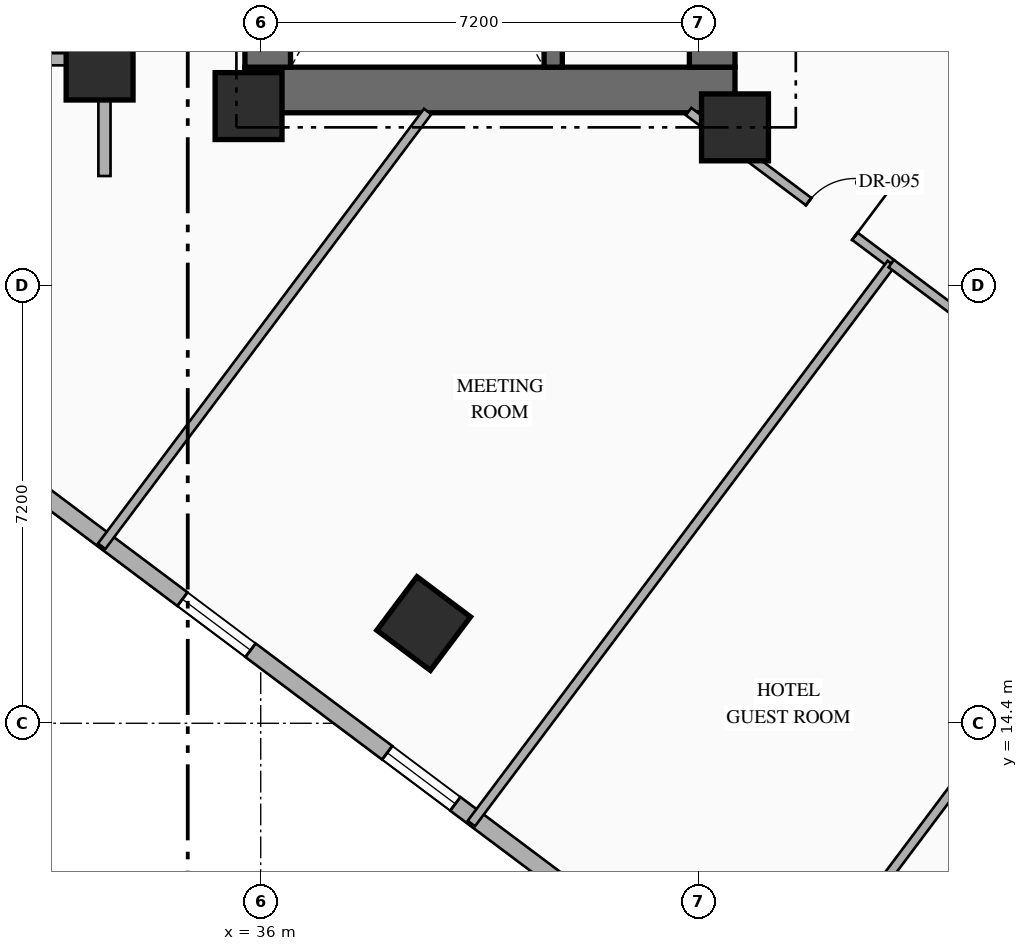
"""IFC4 building model, lengths in metres.
Left out: names, types, materials, properties, quantities, classifications, styles, units other than length and angle.
Written with IfcOpenShell. Run it as: python <this file> out.ifc"""

import sys

from ifc_helpers import new_model, si_unit, direction, frame, frame_2d, origin, origin_2d, place, context, subcontext, project, spatial, rectangle, hollow_rectangle, extrude, element, fill, save


model = new_model("IFC4")
c1 = context("Model", 3, precision=1e-05, world=origin(), true_north=direction((0.0, 1.0)))
c2 = subcontext(c1, "Body", "Model", "MODEL_VIEW")
j1 = project(units=[si_unit("LENGTHUNIT", "METRE"), si_unit("PLANEANGLEUNIT", "RADIAN")], contexts=[c1])
p1 = place(None, origin())
s1 = spatial("IfcSite", under=j1, at=p1, CompositionType="ELEMENT")
p2 = place(p1, origin())
s2 = spatial("IfcBuilding", under=s1, at=p2, CompositionType="ELEMENT")
p3 = place(p2, frame((0.0, 0.0, 39.95)))
s3 = spatial("IfcBuildingStorey", under=s2, at=p3, CompositionType="ELEMENT", Elevation=39.95)
p4 = place(p3, frame((35.74, 24.815, 0.0), z_axis=(0.0, 0.0, 1.0), x_axis=(1.0, 0.0, 0.0)))
e1 = element("IfcWall", 1, at=p4, inside=s3, PredefinedType="SHEAR", context=c2, shape_type="SweptSolid", body=[
    extrude(rectangle(XDim=8.06, YDim=0.75, at=frame_2d((4.03, 0.0))), origin(), (0.0, 0.0, 1.0), 3.35),
])
p5 = place(p3, frame((36.115, 25.19, 0.0), z_axis=(0.0, 0.0, 1.0), x_axis=(0.0, 1.0, 0.0)))
e2 = element("IfcWall", 2, at=p5, inside=s3, PredefinedType="SHEAR", context=c2, shape_type="SweptSolid", body=[
    extrude(rectangle(XDim=9.48, YDim=0.75, at=frame_2d((4.74, 0.0))), origin(), (0.0, 0.0, 1.0), 3.35),
])
p6 = place(p3, frame((43.425, 25.19, 0.0), z_axis=(0.0, 0.0, 1.0), x_axis=(0.0, 1.0, 0.0)))
e3 = element("IfcWall", 3, at=p6, inside=s3, PredefinedType="SHEAR", context=c2, shape_type="SweptSolid", body=[
    extrude(rectangle(XDim=9.48, YDim=0.75, at=frame_2d((4.74, 0.0))), origin(), (0.0, 0.0, 1.0), 3.35),
])
p7 = place(p6, frame((0.66, 0.0, 0.0)))
e4 = element("IfcOpeningElement", 4, at=p7, cuts=e3, PredefinedType="OPENING", context=c2, shape_type="SweptSolid", body=[
    extrude(rectangle(XDim=0.85, YDim=2.08, at=frame_2d((0.425, 1.04))), frame((0.0, 0.385, 0.0), z_axis=(0.0, -1.0, 0.0), x_axis=(1.0, 0.0, 0.0)), (0.0, 0.0, 1.0), 0.77),
])
p8 = place(p6, frame((2.86, 0.0, 0.0)))
e5 = element("IfcOpeningElement", 5, at=p8, cuts=e3, PredefinedType="OPENING", context=c2, shape_type="SweptSolid", body=[
    extrude(rectangle(XDim=0.85, YDim=2.08, at=frame_2d((0.425, 1.04))), frame((0.0, 0.385, 0.0), z_axis=(0.0, -1.0, 0.0), x_axis=(1.0, 0.0, 0.0)), (0.0, 0.0, 1.0), 0.77),
])
p9 = place(p6, frame((5.01, 0.0, 0.0)))
e6 = element("IfcOpeningElement", 6, at=p9, cuts=e3, PredefinedType="OPENING", context=c2, shape_type="SweptSolid", body=[
    extrude(rectangle(XDim=0.85, YDim=2.08, at=frame_2d((0.425, 1.04))), frame((0.0, 0.385, 0.0), z_axis=(0.0, -1.0, 0.0), x_axis=(1.0, 0.0, 0.0)), (0.0, 0.0, 1.0), 0.77),
])
p10 = place(p3, frame((40.81, 25.19, 0.0), z_axis=(0.0, 0.0, 1.0), x_axis=(0.0, 1.0, 0.0)))
e7 = element("IfcWall", 7, at=p10, inside=s3, PredefinedType="SHEAR", context=c2, shape_type="SweptSolid", body=[
    extrude(rectangle(XDim=9.48, YDim=0.3, at=frame_2d((4.74, 0.0))), origin(), (0.0, 0.0, 1.0), 3.35),
])
for number, where, z_axis, x_axis in (
    (8, (35.8, 24.55, 0.0), (0.0, 0.0, 1.0), (1.0, 0.0, 0.0)),
    (9, (43.8, 24.2, 0.0), (0.0, 0.0, 1.0), (1.0, 0.0, 0.0)),
):
    element("IfcColumn", number, at=place(p3, frame(where, z_axis=z_axis, x_axis=x_axis)), inside=s3, PredefinedType="COLUMN", context=c2, shape_type="SweptSolid", body=[
        extrude(rectangle(XDim=1.1, YDim=1.1, at=origin_2d()), origin(), (0.0, 0.0, 1.0), 3.35),
    ])
for number, where, z_axis, x_axis in (
    (10, (33.35, 25.2, 0.0), (0.0, 0.0, 1.0), (1.0, 0.0, 0.0)),
    (11, (38.68, 16.04, 0.0), (0.0, 0.0, 1.0), (0.8, -0.6, 0.0)),
):
    element("IfcColumn", number, at=place(p3, frame(where, z_axis=z_axis, x_axis=x_axis)), inside=s3, PredefinedType="COLUMN", context=c2, shape_type="SweptSolid", body=[
        extrude(hollow_rectangle(XDim=1.1, YDim=1.1, WallThickness=0.04, at=origin_2d()), origin(), (0.0, 0.0, 1.0), 3.35),
    ])
p11 = place(p3, frame((44.86, 40.73, 0.0), z_axis=(0.0, 0.0, 1.0), x_axis=(0.800006902154, -0.599990797017, 0.0)))
e12 = element("IfcWall", 12, at=p11, inside=s3, PredefinedType="STANDARD", context=c2, shape_type="SweptSolid", body=[
    extrude(rectangle(XDim=29.712, YDim=0.28, at=frame_2d((14.856, 0.0))), origin(), (0.0, 0.0, 1.0), 3.13),
])
p12 = place(p11, frame((14.249, 0.0, 0.0)))
e13 = element("IfcOpeningElement", 13, at=p12, cuts=e12, PredefinedType="OPENING", context=c2, shape_type="SweptSolid", body=[
    extrude(rectangle(XDim=1.1, YDim=2.2, at=frame_2d((0.55, 1.1))), frame((0.0, 0.15, 0.0), z_axis=(0.0, -1.0, 0.0), x_axis=(1.0, 0.0, 0.0)), (0.0, 0.0, 1.0), 0.3),
])
p13 = place(p11, frame((1.612, 0.0, 0.85)))
e14 = element("IfcOpeningElement", 14, at=p13, cuts=e12, PredefinedType="OPENING", context=c2, shape_type="SweptSolid", body=[
    extrude(rectangle(XDim=1.4, YDim=1.8, at=frame_2d((0.7, 0.9))), frame((0.0, 0.15, 0.0), z_axis=(0.0, -1.0, 0.0), x_axis=(1.0, 0.0, 0.0)), (0.0, 0.0, 1.0), 0.3),
])
p14 = place(p11, frame((5.667, 0.0, 0.85)))
e15 = element("IfcOpeningElement", 15, at=p14, cuts=e12, PredefinedType="OPENING", context=c2, shape_type="SweptSolid", body=[
    extrude(rectangle(XDim=1.4, YDim=1.8, at=frame_2d((0.7, 0.9))), frame((0.0, 0.15, 0.0), z_axis=(0.0, -1.0, 0.0), x_axis=(1.0, 0.0, 0.0)), (0.0, 0.0, 1.0), 0.3),
])
p15 = place(p11, frame((9.912, 0.0, 0.85)))
e16 = element("IfcOpeningElement", 16, at=p15, cuts=e12, PredefinedType="OPENING", context=c2, shape_type="SweptSolid", body=[
    extrude(rectangle(XDim=1.4, YDim=1.8, at=frame_2d((0.7, 0.9))), frame((0.0, 0.15, 0.0), z_axis=(0.0, -1.0, 0.0), x_axis=(1.0, 0.0, 0.0)), (0.0, 0.0, 1.0), 0.3),
])
p16 = place(p11, frame((19.743, 0.0, 0.85)))
e17 = element("IfcOpeningElement", 17, at=p16, cuts=e12, PredefinedType="OPENING", context=c2, shape_type="SweptSolid", body=[
    extrude(rectangle(XDim=1.4, YDim=1.8, at=frame_2d((0.7, 0.9))), frame((0.0, 0.15, 0.0), z_axis=(0.0, -1.0, 0.0), x_axis=(1.0, 0.0, 0.0)), (0.0, 0.0, 1.0), 0.3),
])
p17 = place(p11, frame((22.645, 0.0, 0.85)))
e18 = element("IfcOpeningElement", 18, at=p17, cuts=e12, PredefinedType="OPENING", context=c2, shape_type="SweptSolid", body=[
    extrude(rectangle(XDim=1.4, YDim=1.8, at=frame_2d((0.7, 0.9))), frame((0.0, 0.15, 0.0), z_axis=(0.0, -1.0, 0.0), x_axis=(1.0, 0.0, 0.0)), (0.0, 0.0, 1.0), 0.3),
])
p18 = place(p11, frame((26.7, 0.0, 0.85)))
e19 = element("IfcOpeningElement", 19, at=p18, cuts=e12, PredefinedType="OPENING", context=c2, shape_type="SweptSolid", body=[
    extrude(rectangle(XDim=1.4, YDim=1.8, at=frame_2d((0.7, 0.9))), frame((0.0, 0.15, 0.0), z_axis=(0.0, -1.0, 0.0), x_axis=(1.0, 0.0, 0.0)), (0.0, 0.0, 1.0), 0.3),
])
p19 = place(p3, frame((53.318, 2.487, 0.0), z_axis=(0.0, 0.0, 1.0), x_axis=(-0.800004174678, 0.599994433723, 0.0)))
e20 = element("IfcWall", 20, at=p19, inside=s3, PredefinedType="STANDARD", context=c2, shape_type="SweptSolid", body=[
    extrude(rectangle(XDim=35.089, YDim=0.28, at=frame_2d((17.544, 0.0))), origin(), (0.0, 0.0, 1.0), 3.13),
])
p20 = place(p19, frame((1.931, 0.0, 0.85)))
e21 = element("IfcOpeningElement", 21, at=p20, cuts=e20, PredefinedType="OPENING", context=c2, shape_type="SweptSolid", body=[
    extrude(rectangle(XDim=1.4, YDim=1.8, at=frame_2d((0.7, 0.9))), frame((0.0, 0.15, 0.0), z_axis=(0.0, -1.0, 0.0), x_axis=(1.0, 0.0, 0.0)), (0.0, 0.0, 1.0), 0.3),
])
p21 = place(p19, frame((6.819, 0.0, 0.85)))
e22 = element("IfcOpeningElement", 22, at=p21, cuts=e20, PredefinedType="OPENING", context=c2, shape_type="SweptSolid", body=[
    extrude(rectangle(XDim=1.4, YDim=1.8, at=frame_2d((0.7, 0.9))), frame((0.0, 0.15, 0.0), z_axis=(0.0, -1.0, 0.0), x_axis=(1.0, 0.0, 0.0)), (0.0, 0.0, 1.0), 0.3),
])
p22 = place(p19, frame((11.832, 0.0, 0.85)))
e23 = element("IfcOpeningElement", 23, at=p22, cuts=e20, PredefinedType="OPENING", context=c2, shape_type="SweptSolid", body=[
    extrude(rectangle(XDim=1.4, YDim=1.8, at=frame_2d((0.7, 0.9))), frame((0.0, 0.15, 0.0), z_axis=(0.0, -1.0, 0.0), x_axis=(1.0, 0.0, 0.0)), (0.0, 0.0, 1.0), 0.3),
])
p23 = place(p19, frame((17.647, 0.0, 0.85)))
e24 = element("IfcOpeningElement", 24, at=p23, cuts=e20, PredefinedType="OPENING", context=c2, shape_type="SweptSolid", body=[
    extrude(rectangle(XDim=1.4, YDim=1.8, at=frame_2d((0.7, 0.9))), frame((0.0, 0.15, 0.0), z_axis=(0.0, -1.0, 0.0), x_axis=(1.0, 0.0, 0.0)), (0.0, 0.0, 1.0), 0.3),
])
p24 = place(p19, frame((21.857, 0.0, 0.85)))
e25 = element("IfcOpeningElement", 25, at=p24, cuts=e20, PredefinedType="OPENING", context=c2, shape_type="SweptSolid", body=[
    extrude(rectangle(XDim=1.4, YDim=1.8, at=frame_2d((0.7, 0.9))), frame((0.0, 0.15, 0.0), z_axis=(0.0, -1.0, 0.0), x_axis=(1.0, 0.0, 0.0)), (0.0, 0.0, 1.0), 0.3),
])
p25 = place(p19, frame((26.87, 0.0, 0.85)))
e26 = element("IfcOpeningElement", 26, at=p25, cuts=e20, PredefinedType="OPENING", context=c2, shape_type="SweptSolid", body=[
    extrude(rectangle(XDim=1.4, YDim=1.8, at=frame_2d((0.7, 0.9))), frame((0.0, 0.15, 0.0), z_axis=(0.0, -1.0, 0.0), x_axis=(1.0, 0.0, 0.0)), (0.0, 0.0, 1.0), 0.3),
])
p26 = place(p19, frame((31.757, 0.0, 0.85)))
e27 = element("IfcOpeningElement", 27, at=p26, cuts=e20, PredefinedType="OPENING", context=c2, shape_type="SweptSolid", body=[
    extrude(rectangle(XDim=1.4, YDim=1.8, at=frame_2d((0.7, 0.9))), frame((0.0, 0.15, 0.0), z_axis=(0.0, -1.0, 0.0), x_axis=(1.0, 0.0, 0.0)), (0.0, 0.0, 1.0), 0.3),
])
p27 = place(p3, frame((33.43, 23.4, 0.0), z_axis=(0.0, 0.0, 1.0), x_axis=(0.0, 1.0, 0.0)))
e28 = element("IfcWall", 28, at=p27, inside=s3, PredefinedType="STANDARD", context=c2, shape_type="SweptSolid", body=[
    extrude(rectangle(XDim=4.08, YDim=0.2, at=frame_2d((2.04, 0.0))), origin(), (0.0, 0.0, 1.0), 2.425),
])
p28 = place(p3, frame((25.55, 25.32, 0.0), z_axis=(0.0, 0.0, 1.0), x_axis=(1.0, 0.0, 0.0)))
e29 = element("IfcWall", 29, at=p28, inside=s3, PredefinedType="STANDARD", context=c2, shape_type="SweptSolid", body=[
    extrude(rectangle(XDim=7.88, YDim=0.2, at=frame_2d((3.94, 0.0))), origin(), (0.0, 0.0, 1.0), 2.525),
])
p29 = place(p3, frame((43.037, 24.46, 0.0), z_axis=(0.0, 0.0, 1.0), x_axis=(0.799971872363, -0.600037501685, 0.0)))
e30 = element("IfcWall", 30, at=p29, inside=s3, PredefinedType="PARTITIONING", context=c2, shape_type="SweptSolid", body=[
    extrude(rectangle(XDim=4.167, YDim=0.15, at=frame_2d((2.083, 0.0))), origin(), (0.0, 0.0, 1.0), 2.425),
])
p30 = place(p29, frame((2.468, 0.0, 0.0)))
e31 = element("IfcOpeningElement", 31, at=p30, cuts=e30, PredefinedType="OPENING", context=c2, shape_type="SweptSolid", body=[
    extrude(rectangle(XDim=0.95, YDim=2.15, at=frame_2d((0.475, 1.075))), frame((0.0, 0.085, 0.0), z_axis=(0.0, -1.0, 0.0), x_axis=(1.0, 0.0, 0.0)), (0.0, 0.0, 1.0), 0.17),
])
p31 = place(p3, frame((33.384, 17.312, 0.0), z_axis=(0.0, 0.0, 1.0), x_axis=(0.600008743659, 0.799993442181, 0.0)))
e32 = element("IfcWall", 32, at=p31, inside=s3, PredefinedType="PARTITIONING", context=c2, shape_type="SweptSolid", body=[
    extrude(rectangle(XDim=8.935, YDim=0.15, at=frame_2d((4.468, 0.0))), origin(), (0.0, 0.0, 1.0), 3.13),
])
p32 = place(p3, frame((39.464, 12.752, 0.0), z_axis=(0.0, 0.0, 1.0), x_axis=(0.6, 0.8, 0.0)))
e33 = element("IfcWall", 33, at=p32, inside=s3, PredefinedType="PARTITIONING", context=c2, shape_type="SweptSolid", body=[
    extrude(rectangle(XDim=11.51, YDim=0.15, at=frame_2d((5.755, 0.0))), origin(), (0.0, 0.0, 1.0), 3.13),
])
p33 = place(p3, frame((46.37, 21.96, 0.0), z_axis=(0.0, 0.0, 1.0), x_axis=(0.799977170108, -0.600030438649, 0.0)))
e34 = element("IfcWall", 34, at=p33, inside=s3, PredefinedType="PARTITIONING", context=c2, shape_type="SweptSolid", body=[
    extrude(rectangle(XDim=3.85, YDim=0.15, at=frame_2d((1.925, 0.0))), origin(), (0.0, 0.0, 1.0), 2.425),
])
p34 = place(p33, frame((1.45, 0.0, 0.0)))
e35 = element("IfcOpeningElement", 35, at=p34, cuts=e34, PredefinedType="OPENING", context=c2, shape_type="SweptSolid", body=[
    extrude(rectangle(XDim=0.95, YDim=2.15, at=frame_2d((0.475, 1.075))), frame((0.0, 0.085, 0.0), z_axis=(0.0, -1.0, 0.0), x_axis=(1.0, 0.0, 0.0)), (0.0, 0.0, 1.0), 0.17),
])
p35 = place(p3, frame((44.36, 9.28, 0.0), z_axis=(0.0, 0.0, 1.0), x_axis=(0.599986233332, 0.800010324816, 0.0)))
e36 = element("IfcWall", 36, at=p35, inside=s3, PredefinedType="PARTITIONING", context=c2, shape_type="SweptSolid", body=[
    extrude(rectangle(XDim=11.35, YDim=0.15, at=frame_2d((5.675, 0.0))), origin(), (0.0, 0.0, 1.0), 2.425),
])
p36 = place(p23, origin())
e37 = element("IfcWindow", 37, at=p36, inside=s3, PartitioningType="SINGLE_PANEL", PredefinedType="WINDOW", context=c2, shape_type="SweptSolid", body=[
    extrude(rectangle(XDim=1.4, YDim=1.8, at=frame_2d((0.7, 0.9))), frame((0.0, 0.03, 0.0), z_axis=(0.0, -1.0, 0.0), x_axis=(1.0, 0.0, 0.0)), (0.0, 0.0, 1.0), 0.06),
])
fill(e24, e37)
p37 = place(p24, origin())
e38 = element("IfcWindow", 38, at=p37, inside=s3, PartitioningType="SINGLE_PANEL", PredefinedType="WINDOW", context=c2, shape_type="SweptSolid", body=[
    extrude(rectangle(XDim=1.4, YDim=1.8, at=frame_2d((0.7, 0.9))), frame((0.0, 0.03, 0.0), z_axis=(0.0, -1.0, 0.0), x_axis=(1.0, 0.0, 0.0)), (0.0, 0.0, 1.0), 0.06),
])
fill(e25, e38)
p38 = place(p30, origin())
e39 = element("IfcDoor", 39, at=p38, inside=s3, OperationType="SINGLE_SWING_RIGHT", PredefinedType="DOOR", context=c2, shape_type="SweptSolid", body=[
    extrude(rectangle(XDim=0.95, YDim=2.15, at=frame_2d((0.475, 1.075))), frame((0.0, 0.025, 0.0), z_axis=(0.0, -1.0, 0.0), x_axis=(1.0, 0.0, 0.0)), (0.0, 0.0, 1.0), 0.05),
])
fill(e31, e39)
save(model, sys.argv[1])
